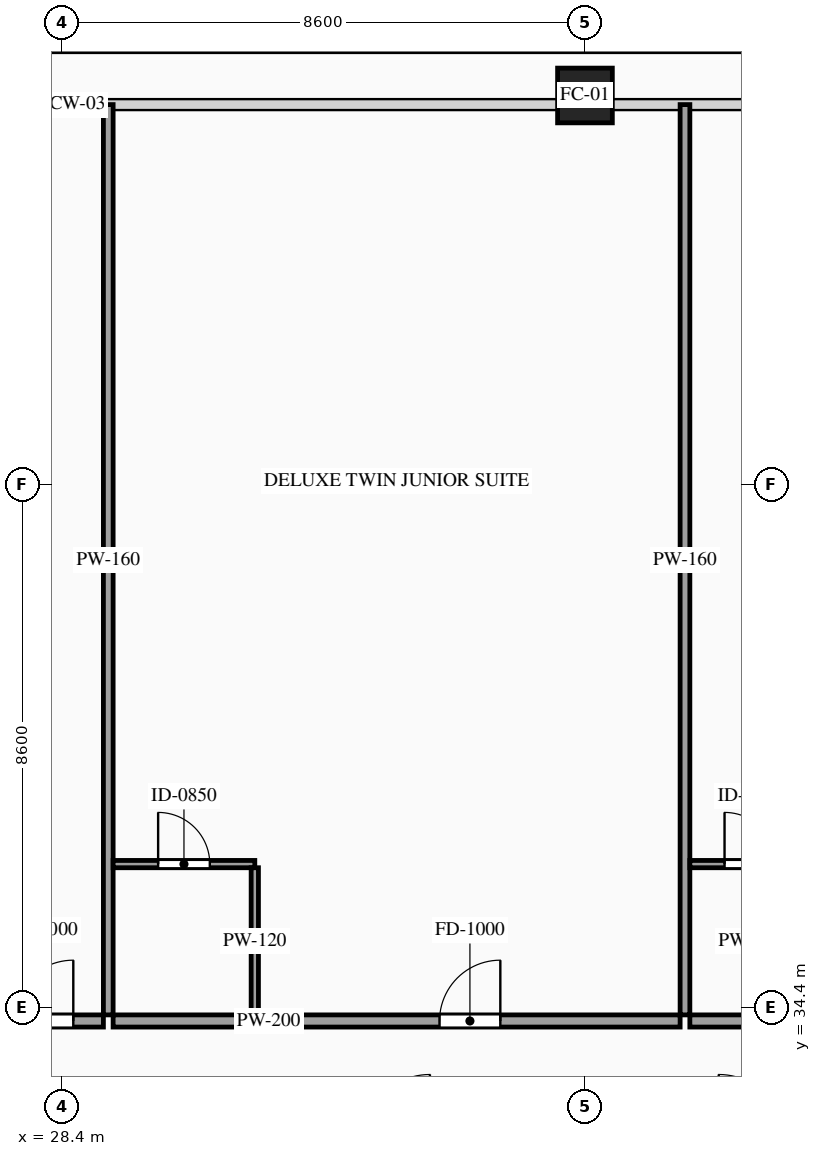
"""IFC4 building model, lengths in metres.
Left out: names, types, materials, properties, quantities, classifications, styles, units other than length and angle.
Written with IfcOpenShell. Run it as: python <this file> out.ifc"""

import sys

from ifc_helpers import new_model, si_unit, direction, frame, frame_2d, origin, origin_2d, place, context, subcontext, project, spatial, rectangle, hollow_rectangle, extrude, source, transform, mapped, element, fill, save


model = new_model("IFC4")
c1 = context("Model", 3, precision=1e-05, world=origin(), true_north=direction((0.0, 1.0)))
c2 = subcontext(c1, "Body", "Model", "MODEL_VIEW")
j1 = project(units=[si_unit("LENGTHUNIT", "METRE"), si_unit("PLANEANGLEUNIT", "RADIAN")], contexts=[c1])
p1 = place(None, origin())
s1 = spatial("IfcSite", under=j1, at=p1, CompositionType="ELEMENT")
p2 = place(p1, origin())
s2 = spatial("IfcBuilding", under=s1, at=p2, CompositionType="ELEMENT")
p3 = place(p2, frame((0.0, 0.0, 145.2)))
s3 = spatial("IfcBuildingStorey", under=s2, at=p3, CompositionType="ELEMENT", Elevation=145.2)
m1 = source(origin(), c2, "Body", "SweptSolid", [
    extrude(hollow_rectangle(XDim=0.9, YDim=0.9, WallThickness=0.042, at=origin_2d()), origin(), (0.0, 0.0, 1.0), 3.6),
])
p4 = place(p3, frame((37.0, 49.4, 0.0), z_axis=(0.0, 0.0, 1.0), x_axis=(1.0, 0.0, 0.0)))
e1 = element("IfcColumn", 1, at=p4, inside=s3, PredefinedType="COLUMN", context=c2, shape_type="MappedRepresentation", body=[
    mapped(m1, transform((0.0, 0.0, 0.0), scale=1.0)),
])
p5 = place(p3, frame((25.018, 34.18, 0.0), z_axis=(0.0, 0.0, 1.0), x_axis=(1.0, 0.0, 0.0)))
e2 = element("IfcWall", 2, at=p5, inside=s3, PredefinedType="PARTITIONING", context=c2, shape_type="SweptSolid", body=[
    extrude(rectangle(XDim=4.062, YDim=0.2, at=frame_2d((2.031, 0.0))), origin(), (0.0, 0.0, 1.0), 3.38),
])
p6 = place(p5, frame((2.567, 0.0, 0.0)))
e3 = element("IfcOpeningElement", 3, at=p6, cuts=e2, PredefinedType="OPENING", context=c2, shape_type="SweptSolid", body=[
    extrude(rectangle(XDim=1.0, YDim=2.2, at=frame_2d((0.5, 1.1))), frame((0.0, 0.115, 0.0), z_axis=(0.0, -1.0, 0.0), x_axis=(1.0, 0.0, 0.0)), (0.0, 0.0, 1.0), 0.23),
])
m2 = source(origin(), c2, "Body", "SweptSolid", [
    extrude(rectangle(XDim=14.97, YDim=0.16, at=frame_2d((7.485, 0.0))), origin(), (0.0, 0.0, 1.0), 3.38),
])
p7 = place(p3, frame((29.16, 34.28, 0.0), z_axis=(0.0, 0.0, 1.0), x_axis=(0.0, 1.0, 0.0)))
e4 = element("IfcWall", 4, at=p7, inside=s3, PredefinedType="PARTITIONING", context=c2, shape_type="MappedRepresentation", body=[
    mapped(m2, transform((0.0, 0.0, 0.0), scale=1.0)),
])
p8 = place(p3, frame((29.24, 34.18, 0.0), z_axis=(0.0, 0.0, 1.0), x_axis=(1.0, 0.0, 0.0)))
e5 = element("IfcWall", 5, at=p8, inside=s3, PredefinedType="PARTITIONING", context=c2, shape_type="SweptSolid", body=[
    extrude(rectangle(XDim=9.325, YDim=0.2, at=frame_2d((4.663, 0.0))), origin(), (0.0, 0.0, 1.0), 3.38),
])
p9 = place(p8, frame((5.368, 0.0, 0.0)))
e6 = element("IfcOpeningElement", 6, at=p9, cuts=e5, PredefinedType="OPENING", context=c2, shape_type="SweptSolid", body=[
    extrude(rectangle(XDim=1.0, YDim=2.2, at=frame_2d((0.5, 1.1))), frame((0.0, 0.115, 0.0), z_axis=(0.0, -1.0, 0.0), x_axis=(1.0, 0.0, 0.0)), (0.0, 0.0, 1.0), 0.23),
])
p10 = place(p3, frame((38.645, 34.28, 0.0), z_axis=(0.0, 0.0, 1.0), x_axis=(0.0, 1.0, 0.0)))
e7 = element("IfcWall", 7, at=p10, inside=s3, PredefinedType="PARTITIONING", context=c2, shape_type="MappedRepresentation", body=[
    mapped(m2, transform((0.0, 0.0, 0.0), scale=1.0)),
])
p11 = place(p3, frame((29.24, 36.76, 0.0), z_axis=(0.0, 0.0, 1.0), x_axis=(1.0, 0.0, 0.0)))
e8 = element("IfcWall", 8, at=p11, inside=s3, PredefinedType="PARTITIONING", context=c2, shape_type="SweptSolid", body=[
    extrude(rectangle(XDim=2.33, YDim=0.12, at=frame_2d((1.165, 0.0))), origin(), (0.0, 0.0, 1.0), 3.38),
])
p12 = place(p11, frame((0.74, 0.0, 0.0)))
e9 = element("IfcOpeningElement", 9, at=p12, cuts=e8, PredefinedType="OPENING", context=c2, shape_type="SweptSolid", body=[
    extrude(rectangle(XDim=0.85, YDim=2.1, at=frame_2d((0.425, 1.05))), frame((0.0, 0.075, 0.0), z_axis=(0.0, -1.0, 0.0), x_axis=(1.0, 0.0, 0.0)), (0.0, 0.0, 1.0), 0.15),
])
m3 = source(origin(), c2, "Body", "SweptSolid", [
    extrude(rectangle(XDim=2.42, YDim=0.12, at=frame_2d((1.21, 0.0))), origin(), (0.0, 0.0, 1.0), 3.38),
])
p13 = place(p3, frame((31.57, 34.28, 0.0), z_axis=(0.0, 0.0, 1.0), x_axis=(0.0, 1.0, 0.0)))
e10 = element("IfcWall", 10, at=p13, inside=s3, PredefinedType="PARTITIONING", context=c2, shape_type="MappedRepresentation", body=[
    mapped(m3, transform((0.0, 0.0, 0.0), scale=1.0)),
])
p14 = place(p3, frame((38.725, 34.18, 0.0), z_axis=(0.0, 0.0, 1.0), x_axis=(1.0, 0.0, 0.0)))
e11 = element("IfcWall", 11, at=p14, inside=s3, PredefinedType="PARTITIONING", context=c2, shape_type="SweptSolid", body=[
    extrude(rectangle(XDim=4.061, YDim=0.2, at=frame_2d((2.03, 0.0))), origin(), (0.0, 0.0, 1.0), 3.38),
])
p15 = place(p14, frame((2.566, 0.0, 0.0)))
e12 = element("IfcOpeningElement", 12, at=p15, cuts=e11, PredefinedType="OPENING", context=c2, shape_type="SweptSolid", body=[
    extrude(rectangle(XDim=1.0, YDim=2.2, at=frame_2d((0.5, 1.1))), frame((0.0, 0.115, 0.0), z_axis=(0.0, -1.0, 0.0), x_axis=(1.0, 0.0, 0.0)), (0.0, 0.0, 1.0), 0.23),
])
p16 = place(p3, frame((38.725, 36.76, 0.0), z_axis=(0.0, 0.0, 1.0), x_axis=(1.0, 0.0, 0.0)))
e13 = element("IfcWall", 13, at=p16, inside=s3, PredefinedType="PARTITIONING", context=c2, shape_type="SweptSolid", body=[
    extrude(rectangle(XDim=1.991, YDim=0.12, at=frame_2d((0.996, 0.0))), origin(), (0.0, 0.0, 1.0), 3.38),
])
p17 = place(p16, frame((0.571, 0.0, 0.0)))
e14 = element("IfcOpeningElement", 14, at=p17, cuts=e13, PredefinedType="OPENING", context=c2, shape_type="SweptSolid", body=[
    extrude(rectangle(XDim=0.85, YDim=2.1, at=frame_2d((0.425, 1.05))), frame((0.0, 0.075, 0.0), z_axis=(0.0, -1.0, 0.0), x_axis=(1.0, 0.0, 0.0)), (0.0, 0.0, 1.0), 0.15),
])
m4 = source(origin(), c2, "Body", "SweptSolid", [
    extrude(rectangle(XDim=1.0, YDim=2.2, at=frame_2d((0.5, 1.1))), frame((0.0, 0.025, 0.0), z_axis=(0.0, -1.0, 0.0), x_axis=(1.0, 0.0, 0.0)), (0.0, 0.0, 1.0), 0.05),
])
p18 = place(p6, origin())
e15 = element("IfcDoor", 15, at=p18, inside=s3, OperationType="SINGLE_SWING_RIGHT", PredefinedType="DOOR", context=c2, shape_type="MappedRepresentation", body=[
    mapped(m4, transform((0.0, 0.0, 0.0), scale=1.0)),
])
fill(e3, e15)
p19 = place(p9, origin())
e16 = element("IfcDoor", 16, at=p19, inside=s3, OperationType="SINGLE_SWING_RIGHT", PredefinedType="DOOR", context=c2, shape_type="MappedRepresentation", body=[
    mapped(m4, transform((0.0, 0.0, 0.0), scale=1.0)),
])
fill(e6, e16)
m5 = source(origin(), c2, "Body", "SweptSolid", [
    extrude(rectangle(XDim=0.85, YDim=2.1, at=frame_2d((0.425, 1.05))), frame((0.0, 0.025, 0.0), z_axis=(0.0, -1.0, 0.0), x_axis=(1.0, 0.0, 0.0)), (0.0, 0.0, 1.0), 0.05),
])
p20 = place(p12, origin())
e17 = element("IfcDoor", 17, at=p20, inside=s3, OperationType="SINGLE_SWING_LEFT", PredefinedType="DOOR", context=c2, shape_type="MappedRepresentation", body=[
    mapped(m5, transform((0.0, 0.0, 0.0), scale=1.0)),
])
fill(e9, e17)
p21 = place(p17, origin())
e18 = element("IfcDoor", 18, at=p21, inside=s3, OperationType="SINGLE_SWING_LEFT", PredefinedType="DOOR", context=c2, shape_type="MappedRepresentation", body=[
    mapped(m5, transform((0.0, 0.0, 0.0), scale=1.0)),
])
fill(e14, e18)
save(model, sys.argv[1])
